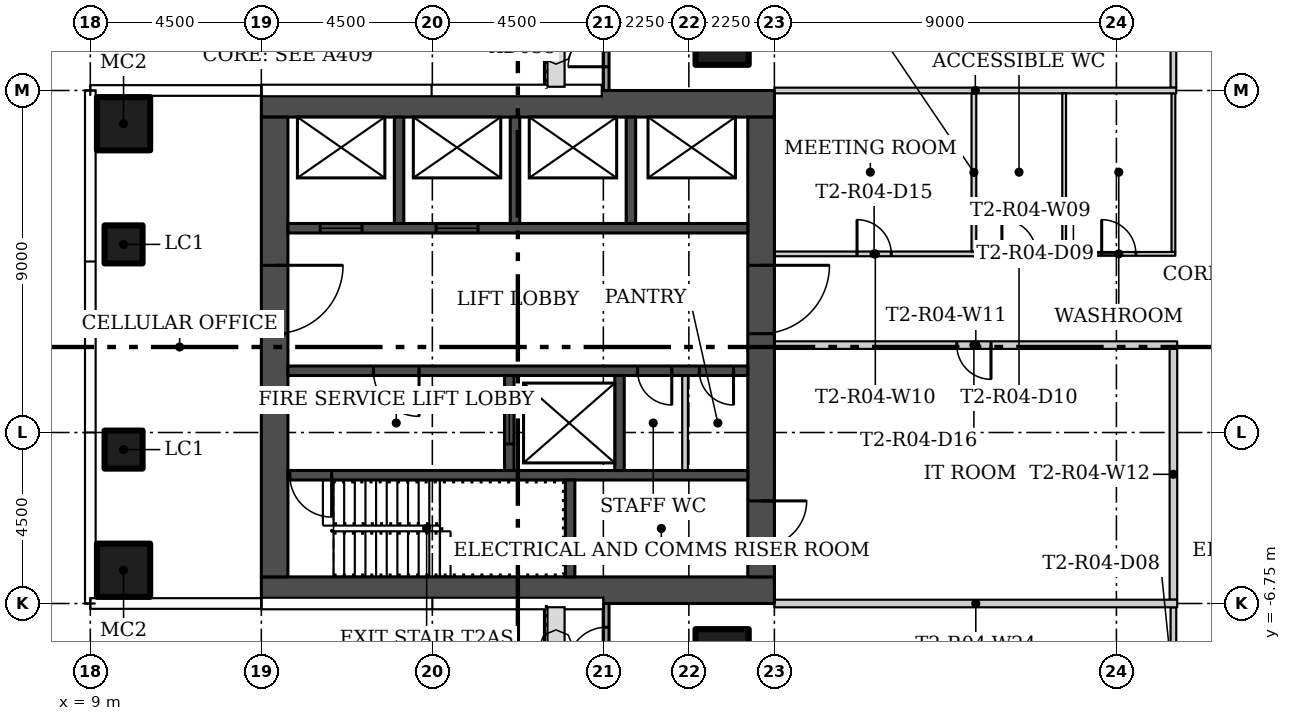
"""IFC4 building model, lengths in metres.
Left out: names, types, materials, properties, quantities, classifications, styles, units other than length and angle.
Written with IfcOpenShell. Run it as: python <this file> out.ifc"""

import sys

from ifc_helpers import new_model, si_unit, direction, frame, frame_2d, origin, origin_2d, place, context, subcontext, project, spatial, rectangle, hollow_rectangle, extrude, element, fill, save


model = new_model("IFC4")
c1 = context("Model", 3, precision=1e-05, world=origin(), true_north=direction((0.0, 1.0)))
c2 = subcontext(c1, "Body", "Model", "MODEL_VIEW")
j1 = project(units=[si_unit("LENGTHUNIT", "METRE"), si_unit("PLANEANGLEUNIT", "RADIAN")], contexts=[c1])
p1 = place(None, origin())
s1 = spatial("IfcSite", under=j1, at=p1, CompositionType="ELEMENT")
p2 = place(p1, origin())
s2 = spatial("IfcBuilding", under=s1, at=p2, CompositionType="ELEMENT")
p3 = place(p2, frame((0.0, 0.0, 49.8)))
s3 = spatial("IfcBuildingStorey", under=s2, at=p3, CompositionType="ELEMENT", Elevation=49.8)
for number, where in (
    (1, (25.625, 8.125, 0.0)),
    (2, (25.625, -8.125, 0.0)),
    (3, (9.875, -5.875, 0.0)),
    (4, (9.875, 5.875, 0.0)),
):
    element("IfcColumn", number, at=place(p3, frame(where)), inside=s3, PredefinedType="COLUMN", context=c2, shape_type="SweptSolid", body=[
        extrude(hollow_rectangle(XDim=1.4, YDim=1.4, WallThickness=0.05, at=origin_2d()), origin(), (0.0, 0.0, 1.0), 3.55),
    ])
for number, where in (
    (5, (9.875, -2.7, 0.0)),
    (6, (9.875, 2.7, 0.0)),
):
    element("IfcColumn", number, at=place(p3, frame(where)), inside=s3, PredefinedType="COLUMN", context=c2, shape_type="SweptSolid", body=[
        extrude(hollow_rectangle(XDim=1.0, YDim=1.0, WallThickness=0.04, at=origin_2d()), origin(), (0.0, 0.0, 1.0), 3.55),
    ])
p4 = place(p3, frame((37.5, 6.825, 0.0), z_axis=(0.0, 0.0, 1.0), x_axis=(0.0, 1.0, 0.0)))
e7 = element("IfcWall", 7, at=p4, inside=s3, PredefinedType="PARTITIONING", context=c2, shape_type="SweptSolid", body=[
    extrude(rectangle(XDim=4.35, YDim=0.15, at=frame_2d((2.175, 0.0))), origin(), (0.0, 0.0, 1.0), 3.55),
])
p5 = place(p4, frame((1.675, 0.0, 0.0)))
e8 = element("IfcOpeningElement", 8, at=p5, cuts=e7, PredefinedType="OPENING", context=c2, shape_type="SweptSolid", body=[
    extrude(rectangle(XDim=1.0, YDim=2.4, at=frame_2d((0.5, 1.2))), frame((0.0, 0.085, 0.0), z_axis=(0.0, -1.0, 0.0), x_axis=(1.0, 0.0, 0.0)), (0.0, 0.0, 1.0), 0.17),
])
p6 = place(p3, frame((37.5, -11.175, 0.0), z_axis=(0.0, 0.0, 1.0), x_axis=(0.0, 1.0, 0.0)))
e9 = element("IfcWall", 9, at=p6, inside=s3, PredefinedType="PARTITIONING", context=c2, shape_type="SweptSolid", body=[
    extrude(rectangle(XDim=4.325, YDim=0.15, at=frame_2d((2.163, 0.0))), origin(), (0.0, 0.0, 1.0), 3.55),
])
p7 = place(p6, frame((1.675, 0.0, 0.0)))
e10 = element("IfcOpeningElement", 10, at=p7, cuts=e9, PredefinedType="OPENING", context=c2, shape_type="SweptSolid", body=[
    extrude(rectangle(XDim=1.0, YDim=2.4, at=frame_2d((0.5, 1.2))), frame((0.0, 0.085, 0.0), z_axis=(0.0, -1.0, 0.0), x_axis=(1.0, 0.0, 0.0)), (0.0, 0.0, 1.0), 0.17),
])
p8 = place(p3, frame((37.5, 2.5, 0.0), z_axis=(0.0, 0.0, 1.0), x_axis=(0.0, 1.0, 0.0)))
e11 = element("IfcWall", 11, at=p8, inside=s3, PredefinedType="PARTITIONING", context=c2, shape_type="SweptSolid", body=[
    extrude(rectangle(XDim=4.175, YDim=0.1, at=frame_2d((2.087, 0.0))), origin(), (0.0, 0.0, 1.0), 3.55),
])
p9 = place(p3, frame((32.188, 2.45, 0.0)))
e12 = element("IfcWall", 12, at=p9, inside=s3, PredefinedType="PARTITIONING", context=c2, shape_type="SweptSolid", body=[
    extrude(rectangle(XDim=5.363, YDim=0.1, at=frame_2d((2.681, 0.0))), origin(), (0.0, 0.0, 1.0), 3.55),
])
p10 = place(p9, frame((3.425, 0.0, 0.0)))
e13 = element("IfcOpeningElement", 13, at=p10, cuts=e12, PredefinedType="OPENING", context=c2, shape_type="SweptSolid", body=[
    extrude(rectangle(XDim=0.9, YDim=2.1, at=frame_2d((0.45, 1.05))), frame((0.0, 0.06, 0.0), z_axis=(0.0, -1.0, 0.0), x_axis=(1.0, 0.0, 0.0)), (0.0, 0.0, 1.0), 0.12),
])
p11 = place(p9, frame((0.8, 0.0, 0.0)))
e14 = element("IfcOpeningElement", 14, at=p11, cuts=e12, PredefinedType="OPENING", context=c2, shape_type="SweptSolid", body=[
    extrude(rectangle(XDim=0.9, YDim=2.1, at=frame_2d((0.45, 1.05))), frame((0.0, 0.06, 0.0), z_axis=(0.0, -1.0, 0.0), x_axis=(1.0, 0.0, 0.0)), (0.0, 0.0, 1.0), 0.12),
])
p12 = place(p3, frame((27.0, 2.45, 0.0)))
e15 = element("IfcWall", 15, at=p12, inside=s3, PredefinedType="PARTITIONING", context=c2, shape_type="SweptSolid", body=[
    extrude(rectangle(XDim=5.312, YDim=0.125, at=frame_2d((2.656, 0.0))), origin(), (0.0, 0.0, 1.0), 3.55),
])
p13 = place(p12, frame((2.175, 0.0, 0.0)))
e16 = element("IfcOpeningElement", 16, at=p13, cuts=e15, PredefinedType="OPENING", context=c2, shape_type="SweptSolid", body=[
    extrude(rectangle(XDim=0.9, YDim=2.1, at=frame_2d((0.45, 1.05))), frame((0.0, 0.073, 0.0), z_axis=(0.0, -1.0, 0.0), x_axis=(1.0, 0.0, 0.0)), (0.0, 0.0, 1.0), 0.145),
])
p14 = place(p3, frame((37.6, 0.05, 0.0), z_axis=(0.0, 0.0, 1.0), x_axis=(-1.0, 0.0, 0.0)))
e17 = element("IfcWall", 17, at=p14, inside=s3, PredefinedType="PARTITIONING", context=c2, shape_type="SweptSolid", body=[
    extrude(rectangle(XDim=10.6, YDim=0.2, at=frame_2d((5.3, 0.0))), origin(), (0.0, 0.0, 1.0), 3.55),
])
p15 = place(p14, frame((4.9, 0.0, 0.0)))
e18 = element("IfcOpeningElement", 18, at=p15, cuts=e17, PredefinedType="OPENING", context=c2, shape_type="SweptSolid", body=[
    extrude(rectangle(XDim=0.9, YDim=2.1, at=frame_2d((0.45, 1.05))), frame((0.0, 0.11, 0.0), z_axis=(0.0, -1.0, 0.0), x_axis=(1.0, 0.0, 0.0)), (0.0, 0.0, 1.0), 0.22),
])
p16 = place(p3, frame((37.5, -6.65, 0.0), z_axis=(0.0, 0.0, 1.0), x_axis=(0.0, 1.0, 0.0)))
e19 = element("IfcWall", 19, at=p16, inside=s3, PredefinedType="PARTITIONING", context=c2, shape_type="SweptSolid", body=[
    extrude(rectangle(XDim=6.6, YDim=0.2, at=frame_2d((3.3, 0.0))), origin(), (0.0, 0.0, 1.0), 3.55),
])
p17 = place(p3, frame((27.0, 6.75, 0.0)))
e20 = element("IfcWall", 20, at=p17, inside=s3, PredefinedType="PARTITIONING", context=c2, shape_type="SweptSolid", body=[
    extrude(rectangle(XDim=10.575, YDim=0.15, at=frame_2d((5.288, 0.0))), origin(), (0.0, 0.0, 1.0), 3.55),
])
p18 = place(p3, frame((34.625, 6.675, 0.0), z_axis=(0.0, 0.0, 1.0), x_axis=(0.0, -1.0, 0.0)))
e21 = element("IfcWall", 21, at=p18, inside=s3, PredefinedType="PARTITIONING", context=c2, shape_type="SweptSolid", body=[
    extrude(rectangle(XDim=4.175, YDim=0.1, at=frame_2d((2.087, 0.0))), origin(), (0.0, 0.0, 1.0), 3.55),
])
p19 = place(p3, frame((32.25, 6.675, 0.0), z_axis=(0.0, 0.0, 1.0), x_axis=(0.0, -1.0, 0.0)))
e22 = element("IfcWall", 22, at=p19, inside=s3, PredefinedType="PARTITIONING", context=c2, shape_type="SweptSolid", body=[
    extrude(rectangle(XDim=4.162, YDim=0.125, at=frame_2d((2.081, 0.0))), origin(), (0.0, 0.0, 1.0), 3.55),
])
p20 = place(p3, frame((37.6, -6.75, 0.0), z_axis=(0.0, 0.0, 1.0), x_axis=(-1.0, 0.0, 0.0)))
e23 = element("IfcWall", 23, at=p20, inside=s3, PredefinedType="PARTITIONING", context=c2, shape_type="SweptSolid", body=[
    extrude(rectangle(XDim=10.6, YDim=0.2, at=frame_2d((5.3, 0.0))), origin(), (0.0, 0.0, 1.0), 3.55),
])
p21 = place(p3, frame((22.575, 6.743, 0.0), z_axis=(0.0, 0.0, 1.0), x_axis=(0.0, 1.0, 0.0)))
e24 = element("IfcWall", 24, at=p21, inside=s3, PredefinedType="SOLIDWALL", context=c2, shape_type="SweptSolid", body=[
    extrude(rectangle(XDim=2.257, YDim=0.15, at=frame_2d((1.128, 0.0))), origin(), (0.0, 0.0, 1.0), 3.45),
])
p22 = place(p21, frame((0.632, 0.0, 0.0)))
e25 = element("IfcOpeningElement", 25, at=p22, cuts=e24, PredefinedType="OPENING", context=c2, shape_type="SweptSolid", body=[
    extrude(rectangle(XDim=1.0, YDim=2.4, at=frame_2d((0.5, 1.2))), frame((0.0, 0.085, 0.0), z_axis=(0.0, -1.0, 0.0), x_axis=(1.0, 0.0, 0.0)), (0.0, 0.0, 1.0), 0.17),
])
p23 = place(p3, frame((22.575, -9.0, 0.0), z_axis=(0.0, 0.0, 1.0), x_axis=(0.0, 1.0, 0.0)))
e26 = element("IfcWall", 26, at=p23, inside=s3, PredefinedType="SOLIDWALL", context=c2, shape_type="SweptSolid", body=[
    extrude(rectangle(XDim=2.257, YDim=0.15, at=frame_2d((1.128, 0.0))), origin(), (0.0, 0.0, 1.0), 3.45),
])
p24 = place(p23, frame((0.625, 0.0, 0.0)))
e27 = element("IfcOpeningElement", 27, at=p24, cuts=e26, PredefinedType="OPENING", context=c2, shape_type="SweptSolid", body=[
    extrude(rectangle(XDim=1.0, YDim=2.4, at=frame_2d((0.5, 1.2))), frame((0.0, 0.085, 0.0), z_axis=(0.0, -1.0, 0.0), x_axis=(1.0, 0.0, 0.0)), (0.0, 0.0, 1.0), 0.17),
])
for number, where in (
    (28, (13.5, -6.4, 0.0)),
    (29, (13.5, 6.4, 0.0)),
):
    element("IfcWall", number, at=place(p3, frame(where)), inside=s3, PredefinedType="SHEAR", context=c2, shape_type="SweptSolid", body=[
        extrude(rectangle(XDim=13.5, YDim=0.7, at=frame_2d((6.75, 0.0))), origin(), (0.0, 0.0, 1.0), 3.55),
    ])
p25 = place(p3, frame((13.85, 6.05, 0.0), z_axis=(0.0, 0.0, 1.0), x_axis=(0.0, -1.0, 0.0)))
e30 = element("IfcWall", 30, at=p25, inside=s3, PredefinedType="SHEAR", context=c2, shape_type="SweptSolid", body=[
    extrude(rectangle(XDim=12.1, YDim=0.7, at=frame_2d((6.05, 0.0))), origin(), (0.0, 0.0, 1.0), 3.55),
])
p26 = place(p25, frame((3.9, 0.0, 0.0)))
e31 = element("IfcOpeningElement", 31, at=p26, cuts=e30, PredefinedType="OPENING", context=c2, shape_type="SweptSolid", body=[
    extrude(rectangle(XDim=1.8, YDim=2.4, at=frame_2d((0.9, 1.2))), frame((0.0, 0.36, 0.0), z_axis=(0.0, -1.0, 0.0), x_axis=(1.0, 0.0, 0.0)), (0.0, 0.0, 1.0), 0.72),
])
p27 = place(p3, frame((26.65, 6.05, 0.0), z_axis=(0.0, 0.0, 1.0), x_axis=(0.0, -1.0, 0.0)))
e32 = element("IfcWall", 32, at=p27, inside=s3, PredefinedType="SHEAR", context=c2, shape_type="SweptSolid", body=[
    extrude(rectangle(XDim=12.1, YDim=0.7, at=frame_2d((6.05, 0.0))), origin(), (0.0, 0.0, 1.0), 3.55),
])
p28 = place(p27, frame((10.1, 0.0, 0.0)))
e33 = element("IfcOpeningElement", 33, at=p28, cuts=e32, PredefinedType="OPENING", context=c2, shape_type="SweptSolid", body=[
    extrude(rectangle(XDim=1.2, YDim=2.1, at=frame_2d((0.6, 1.05))), frame((0.0, 0.36, 0.0), z_axis=(0.0, -1.0, 0.0), x_axis=(1.0, 0.0, 0.0)), (0.0, 0.0, 1.0), 0.72),
])
p29 = place(p27, frame((3.9, 0.0, 0.0)))
e34 = element("IfcOpeningElement", 34, at=p29, cuts=e32, PredefinedType="OPENING", context=c2, shape_type="SweptSolid", body=[
    extrude(rectangle(XDim=1.8, YDim=2.4, at=frame_2d((0.9, 1.2))), frame((0.0, 0.36, 0.0), z_axis=(0.0, -1.0, 0.0), x_axis=(1.0, 0.0, 0.0)), (0.0, 0.0, 1.0), 0.72),
])
p30 = place(p3, frame((26.3, -3.375, 0.0), z_axis=(0.0, 0.0, 1.0), x_axis=(-1.0, 0.0, 0.0)))
e35 = element("IfcWall", 35, at=p30, inside=s3, PredefinedType="SHEAR", context=c2, shape_type="SweptSolid", body=[
    extrude(rectangle(XDim=12.1, YDim=0.25, at=frame_2d((6.05, 0.0))), origin(), (0.0, 0.0, 1.0), 3.55),
])
p31 = place(p30, frame((10.95, 0.0, 0.0)))
e36 = element("IfcOpeningElement", 36, at=p31, cuts=e35, PredefinedType="OPENING", context=c2, shape_type="SweptSolid", body=[
    extrude(rectangle(XDim=1.1, YDim=2.1, at=frame_2d((0.55, 1.05))), frame((0.0, 0.135, 0.0), z_axis=(0.0, -1.0, 0.0), x_axis=(1.0, 0.0, 0.0)), (0.0, 0.0, 1.0), 0.27),
])
p32 = place(p3, frame((21.625, -6.05, 0.0), z_axis=(0.0, 0.0, 1.0), x_axis=(0.0, 1.0, 0.0)))
e37 = element("IfcWall", 37, at=p32, inside=s3, PredefinedType="SHEAR", context=c2, shape_type="SweptSolid", body=[
    extrude(rectangle(XDim=2.55, YDim=0.25, at=frame_2d((1.275, 0.0))), origin(), (0.0, 0.0, 1.0), 3.55),
])
p33 = place(p3, frame((26.3, -0.625, 0.0), z_axis=(0.0, 0.0, 1.0), x_axis=(-1.0, 0.0, 0.0)))
e38 = element("IfcWall", 38, at=p33, inside=s3, PredefinedType="SHEAR", context=c2, shape_type="SweptSolid", body=[
    extrude(rectangle(XDim=12.1, YDim=0.25, at=frame_2d((6.05, 0.0))), origin(), (0.0, 0.0, 1.0), 3.55),
])
p34 = place(p33, frame((8.65, 0.0, 0.0)))
e39 = element("IfcOpeningElement", 39, at=p34, cuts=e38, PredefinedType="OPENING", context=c2, shape_type="SweptSolid", body=[
    extrude(rectangle(XDim=1.2, YDim=2.1, at=frame_2d((0.6, 1.05))), frame((0.0, 0.135, 0.0), z_axis=(0.0, -1.0, 0.0), x_axis=(1.0, 0.0, 0.0)), (0.0, 0.0, 1.0), 0.27),
])
p35 = place(p33, frame((2.0, 0.0, 0.0)))
e40 = element("IfcOpeningElement", 40, at=p35, cuts=e38, PredefinedType="OPENING", context=c2, shape_type="SweptSolid", body=[
    extrude(rectangle(XDim=0.9, YDim=2.1, at=frame_2d((0.45, 1.05))), frame((0.0, 0.135, 0.0), z_axis=(0.0, -1.0, 0.0), x_axis=(1.0, 0.0, 0.0)), (0.0, 0.0, 1.0), 0.27),
])
p36 = place(p33, frame((0.375, 0.0, 0.0)))
e41 = element("IfcOpeningElement", 41, at=p36, cuts=e38, PredefinedType="OPENING", context=c2, shape_type="SweptSolid", body=[
    extrude(rectangle(XDim=0.9, YDim=2.1, at=frame_2d((0.45, 1.05))), frame((0.0, 0.135, 0.0), z_axis=(0.0, -1.0, 0.0), x_axis=(1.0, 0.0, 0.0)), (0.0, 0.0, 1.0), 0.27),
])
p37 = place(p3, frame((20.025, -3.25, 0.0), z_axis=(0.0, 0.0, 1.0), x_axis=(0.0, 1.0, 0.0)))
e42 = element("IfcWall", 42, at=p37, inside=s3, PredefinedType="SHEAR", context=c2, shape_type="SweptSolid", body=[
    extrude(rectangle(XDim=2.5, YDim=0.25, at=frame_2d((1.25, 0.0))), origin(), (0.0, 0.0, 1.0), 3.55),
])
p38 = place(p37, frame((0.7, 0.0, 0.0)))
e43 = element("IfcOpeningElement", 43, at=p38, cuts=e42, PredefinedType="OPENING", context=c2, shape_type="SweptSolid", body=[
    extrude(rectangle(XDim=1.1, YDim=2.1, at=frame_2d((0.55, 1.05))), frame((0.0, 0.135, 0.0), z_axis=(0.0, -1.0, 0.0), x_axis=(1.0, 0.0, 0.0)), (0.0, 0.0, 1.0), 0.27),
])
p39 = place(p3, frame((22.925, -3.25, 0.0), z_axis=(0.0, 0.0, 1.0), x_axis=(0.0, 1.0, 0.0)))
e44 = element("IfcWall", 44, at=p39, inside=s3, PredefinedType="SHEAR", context=c2, shape_type="SweptSolid", body=[
    extrude(rectangle(XDim=2.5, YDim=0.25, at=frame_2d((1.25, 0.0))), origin(), (0.0, 0.0, 1.0), 3.55),
])
p40 = place(p3, frame((24.65, -3.25, 0.0), z_axis=(0.0, 0.0, 1.0), x_axis=(0.0, 1.0, 0.0)))
e45 = element("IfcWall", 45, at=p40, inside=s3, PredefinedType="PARTITIONING", context=c2, shape_type="SweptSolid", body=[
    extrude(rectangle(XDim=2.5, YDim=0.15, at=frame_2d((1.25, 0.0))), origin(), (0.0, 0.0, 1.0), 3.55),
])
p41 = place(p3, frame((14.2, 3.125, 0.0)))
e46 = element("IfcWall", 46, at=p41, inside=s3, PredefinedType="SHEAR", context=c2, shape_type="SweptSolid", body=[
    extrude(rectangle(XDim=12.1, YDim=0.25, at=frame_2d((6.05, 0.0))), origin(), (0.0, 0.0, 1.0), 3.55),
])
p42 = place(p41, frame((0.85, 0.0, 0.0)))
e47 = element("IfcOpeningElement", 47, at=p42, cuts=e46, PredefinedType="OPENING", context=c2, shape_type="SweptSolid", body=[
    extrude(rectangle(XDim=1.1, YDim=2.1, at=frame_2d((0.55, 1.05))), frame((0.0, 0.135, 0.0), z_axis=(0.0, -1.0, 0.0), x_axis=(1.0, 0.0, 0.0)), (0.0, 0.0, 1.0), 0.27),
])
p43 = place(p41, frame((3.9, 0.0, 0.0)))
e48 = element("IfcOpeningElement", 48, at=p43, cuts=e46, PredefinedType="OPENING", context=c2, shape_type="SweptSolid", body=[
    extrude(rectangle(XDim=1.1, YDim=2.1, at=frame_2d((0.55, 1.05))), frame((0.0, 0.135, 0.0), z_axis=(0.0, -1.0, 0.0), x_axis=(1.0, 0.0, 0.0)), (0.0, 0.0, 1.0), 0.27),
])
for number, where, z_axis, x_axis in (
    (49, (17.125, 3.25, 0.0), (0.0, 0.0, 1.0), (0.0, 1.0, 0.0)),
    (50, (20.175, 3.25, 0.0), (0.0, 0.0, 1.0), (0.0, 1.0, 0.0)),
    (51, (23.225, 3.25, 0.0), (0.0, 0.0, 1.0), (0.0, 1.0, 0.0)),
):
    element("IfcWall", number, at=place(p3, frame(where, z_axis=z_axis, x_axis=x_axis)), inside=s3, PredefinedType="SHEAR", context=c2, shape_type="SweptSolid", body=[
        extrude(rectangle(XDim=2.8, YDim=0.25, at=frame_2d((1.4, 0.0))), origin(), (0.0, 0.0, 1.0), 3.55),
    ])
p44 = place(p10, origin())
e52 = element("IfcDoor", 52, at=p44, inside=s3, OperationType="SINGLE_SWING_RIGHT", PredefinedType="DOOR", context=c2, shape_type="SweptSolid", body=[
    extrude(rectangle(XDim=0.9, YDim=2.1, at=frame_2d((0.45, 1.05))), frame((0.0, 0.025, 0.0), z_axis=(0.0, -1.0, 0.0), x_axis=(1.0, 0.0, 0.0)), (0.0, 0.0, 1.0), 0.05),
])
fill(e13, e52)
p45 = place(p11, origin())
e53 = element("IfcDoor", 53, at=p45, inside=s3, OperationType="SINGLE_SWING_RIGHT", PredefinedType="DOOR", context=c2, shape_type="SweptSolid", body=[
    extrude(rectangle(XDim=0.9, YDim=2.1, at=frame_2d((0.45, 1.05))), frame((0.0, 0.025, 0.0), z_axis=(0.0, -1.0, 0.0), x_axis=(1.0, 0.0, 0.0)), (0.0, 0.0, 1.0), 0.05),
])
fill(e14, e53)
p46 = place(p13, origin())
e54 = element("IfcDoor", 54, at=p46, inside=s3, OperationType="SINGLE_SWING_LEFT", PredefinedType="DOOR", context=c2, shape_type="SweptSolid", body=[
    extrude(rectangle(XDim=0.9, YDim=2.1, at=frame_2d((0.45, 1.05))), frame((0.0, 0.025, 0.0), z_axis=(0.0, -1.0, 0.0), x_axis=(1.0, 0.0, 0.0)), (0.0, 0.0, 1.0), 0.05),
])
fill(e16, e54)
p47 = place(p15, origin())
e55 = element("IfcDoor", 55, at=p47, inside=s3, OperationType="SINGLE_SWING_RIGHT", PredefinedType="DOOR", context=c2, shape_type="SweptSolid", body=[
    extrude(rectangle(XDim=0.9, YDim=2.1, at=frame_2d((0.45, 1.05))), frame((0.0, 0.025, 0.0), z_axis=(0.0, -1.0, 0.0), x_axis=(1.0, 0.0, 0.0)), (0.0, 0.0, 1.0), 0.05),
])
fill(e18, e55)
p48 = place(p22, origin())
e56 = element("IfcDoor", 56, at=p48, inside=s3, OperationType="SINGLE_SWING_LEFT", PredefinedType="DOOR", context=c2, shape_type="SweptSolid", body=[
    extrude(rectangle(XDim=1.0, YDim=2.4, at=frame_2d((0.5, 1.2))), frame((0.0, 0.025, 0.0), z_axis=(0.0, -1.0, 0.0), x_axis=(1.0, 0.0, 0.0)), (0.0, 0.0, 1.0), 0.05),
])
fill(e25, e56)
p49 = place(p24, origin())
e57 = element("IfcDoor", 57, at=p49, inside=s3, OperationType="SINGLE_SWING_LEFT", PredefinedType="DOOR", context=c2, shape_type="SweptSolid", body=[
    extrude(rectangle(XDim=1.0, YDim=2.4, at=frame_2d((0.5, 1.2))), frame((0.0, 0.025, 0.0), z_axis=(0.0, -1.0, 0.0), x_axis=(1.0, 0.0, 0.0)), (0.0, 0.0, 1.0), 0.05),
])
fill(e27, e57)
p50 = place(p26, origin())
e58 = element("IfcDoor", 58, at=p50, inside=s3, OperationType="DOUBLE_DOOR_SINGLE_SWING", PredefinedType="DOOR", context=c2, shape_type="SweptSolid", body=[
    extrude(rectangle(XDim=1.8, YDim=2.4, at=frame_2d((0.9, 1.2))), frame((0.0, 0.025, 0.0), z_axis=(0.0, -1.0, 0.0), x_axis=(1.0, 0.0, 0.0)), (0.0, 0.0, 1.0), 0.05),
])
fill(e31, e58)
p51 = place(p28, origin())
e59 = element("IfcDoor", 59, at=p51, inside=s3, OperationType="SINGLE_SWING_RIGHT", PredefinedType="DOOR", context=c2, shape_type="SweptSolid", body=[
    extrude(rectangle(XDim=1.2, YDim=2.1, at=frame_2d((0.6, 1.05))), frame((0.0, 0.025, 0.0), z_axis=(0.0, -1.0, 0.0), x_axis=(1.0, 0.0, 0.0)), (0.0, 0.0, 1.0), 0.05),
])
fill(e33, e59)
p52 = place(p29, origin())
e60 = element("IfcDoor", 60, at=p52, inside=s3, OperationType="DOUBLE_DOOR_SINGLE_SWING", PredefinedType="DOOR", context=c2, shape_type="SweptSolid", body=[
    extrude(rectangle(XDim=1.8, YDim=2.4, at=frame_2d((0.9, 1.2))), frame((0.0, 0.025, 0.0), z_axis=(0.0, -1.0, 0.0), x_axis=(1.0, 0.0, 0.0)), (0.0, 0.0, 1.0), 0.05),
])
fill(e34, e60)
p53 = place(p31, origin())
e61 = element("IfcDoor", 61, at=p53, inside=s3, OperationType="SINGLE_SWING_RIGHT", PredefinedType="DOOR", context=c2, shape_type="SweptSolid", body=[
    extrude(rectangle(XDim=1.1, YDim=2.1, at=frame_2d((0.55, 1.05))), frame((0.0, 0.025, 0.0), z_axis=(0.0, -1.0, 0.0), x_axis=(1.0, 0.0, 0.0)), (0.0, 0.0, 1.0), 0.05),
])
fill(e36, e61)
p54 = place(p34, origin())
e62 = element("IfcDoor", 62, at=p54, inside=s3, OperationType="SINGLE_SWING_RIGHT", PredefinedType="DOOR", context=c2, shape_type="SweptSolid", body=[
    extrude(rectangle(XDim=1.2, YDim=2.1, at=frame_2d((0.6, 1.05))), frame((0.0, 0.025, 0.0), z_axis=(0.0, -1.0, 0.0), x_axis=(1.0, 0.0, 0.0)), (0.0, 0.0, 1.0), 0.05),
])
fill(e39, e62)
p55 = place(p35, origin())
e63 = element("IfcDoor", 63, at=p55, inside=s3, OperationType="SINGLE_SWING_LEFT", PredefinedType="DOOR", context=c2, shape_type="SweptSolid", body=[
    extrude(rectangle(XDim=0.9, YDim=2.1, at=frame_2d((0.45, 1.05))), frame((0.0, 0.025, 0.0), z_axis=(0.0, -1.0, 0.0), x_axis=(1.0, 0.0, 0.0)), (0.0, 0.0, 1.0), 0.05),
])
fill(e40, e63)
p56 = place(p36, origin())
e64 = element("IfcDoor", 64, at=p56, inside=s3, OperationType="SINGLE_SWING_LEFT", PredefinedType="DOOR", context=c2, shape_type="SweptSolid", body=[
    extrude(rectangle(XDim=0.9, YDim=2.1, at=frame_2d((0.45, 1.05))), frame((0.0, 0.025, 0.0), z_axis=(0.0, -1.0, 0.0), x_axis=(1.0, 0.0, 0.0)), (0.0, 0.0, 1.0), 0.05),
])
fill(e41, e64)
p57 = place(p38, origin())
e65 = element("IfcDoor", 65, at=p57, inside=s3, OperationType="SLIDING_TO_LEFT", PredefinedType="DOOR", context=c2, shape_type="SweptSolid", body=[
    extrude(rectangle(XDim=1.1, YDim=2.1, at=frame_2d((0.55, 1.05))), frame((0.0, 0.025, 0.0), z_axis=(0.0, -1.0, 0.0), x_axis=(1.0, 0.0, 0.0)), (0.0, 0.0, 1.0), 0.05),
])
fill(e43, e65)
p58 = place(p42, origin())
e66 = element("IfcDoor", 66, at=p58, inside=s3, OperationType="SLIDING_TO_LEFT", PredefinedType="DOOR", context=c2, shape_type="SweptSolid", body=[
    extrude(rectangle(XDim=1.1, YDim=2.1, at=frame_2d((0.55, 1.05))), frame((0.0, 0.025, 0.0), z_axis=(0.0, -1.0, 0.0), x_axis=(1.0, 0.0, 0.0)), (0.0, 0.0, 1.0), 0.05),
])
fill(e47, e66)
p59 = place(p43, origin())
e67 = element("IfcDoor", 67, at=p59, inside=s3, OperationType="SLIDING_TO_LEFT", PredefinedType="DOOR", context=c2, shape_type="SweptSolid", body=[
    extrude(rectangle(XDim=1.1, YDim=2.1, at=frame_2d((0.55, 1.05))), frame((0.0, 0.025, 0.0), z_axis=(0.0, -1.0, 0.0), x_axis=(1.0, 0.0, 0.0)), (0.0, 0.0, 1.0), 0.05),
])
fill(e48, e67)
save(model, sys.argv[1])
